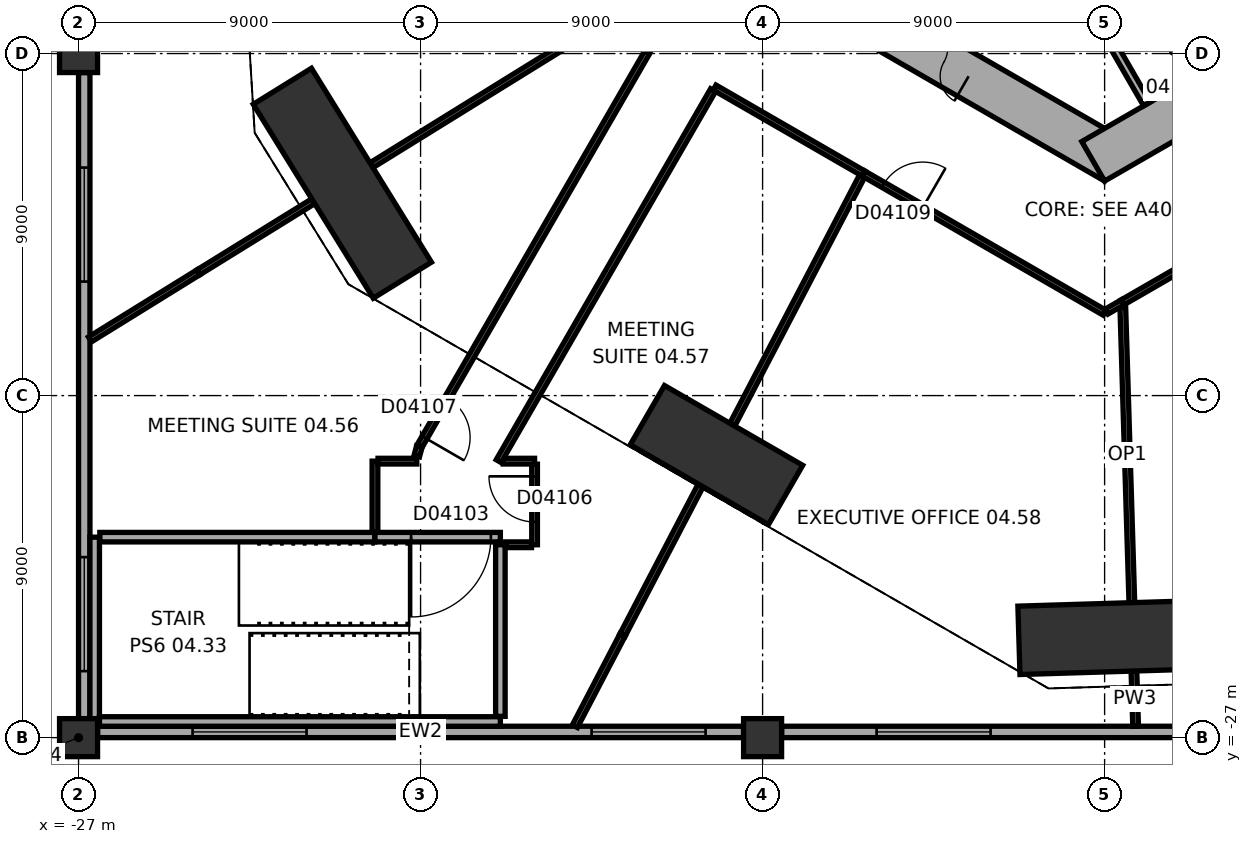
"""IFC4 building model, lengths in metres.
Left out: names, types, materials, properties, quantities, classifications, styles, units other than length and angle.
Written with IfcOpenShell. Run it as: python <this file> out.ifc"""

import sys

from ifc_helpers import new_model, si_unit, direction, frame, frame_2d, origin, origin_2d, place, context, subcontext, project, spatial, rectangle, extrude, element, fill, save


model = new_model("IFC4")
c1 = context("Model", 3, precision=1e-05, world=origin(), true_north=direction((0.0, 1.0)))
c2 = subcontext(c1, "Body", "Model", "MODEL_VIEW")
j1 = project(units=[si_unit("LENGTHUNIT", "METRE"), si_unit("PLANEANGLEUNIT", "RADIAN")], contexts=[c1])
p1 = place(None, origin())
s1 = spatial("IfcSite", under=j1, at=p1, CompositionType="ELEMENT")
p2 = place(p1, origin())
s2 = spatial("IfcBuilding", under=s1, at=p2, CompositionType="ELEMENT")
p3 = place(p2, frame((0.0, 0.0, 29.0)))
s3 = spatial("IfcBuildingStorey", under=s2, at=p3, CompositionType="ELEMENT", Elevation=29.0)
p4 = place(p3, frame((-20.058, -12.413, 0.0), z_axis=(0.0, 0.0, 1.0), x_axis=(0.526202050444, -0.850359572245, 0.0)))
e1 = element("IfcColumn", 1, at=p4, inside=s3, PredefinedType="COLUMN", context=c2, shape_type="SweptSolid", body=[
    extrude(rectangle(XDim=6.0, YDim=1.8, at=origin_2d()), origin(), (0.0, 0.0, 1.0), 5.5),
])
p5 = place(p3, frame((-10.213, -19.564, 0.0), z_axis=(0.0, 0.0, 1.0), x_axis=(0.866028021766, -0.499995465495, 0.0)))
e2 = element("IfcColumn", 2, at=p5, inside=s3, PredefinedType="COLUMN", context=c2, shape_type="SweptSolid", body=[
    extrude(rectangle(XDim=4.2, YDim=1.8, at=origin_2d()), origin(), (0.0, 0.0, 1.0), 5.5),
])
p6 = place(p3, frame((0.744, -24.348, 0.0), z_axis=(0.0, 0.0, 1.0), x_axis=(0.999533484231, 0.03054200224, 0.0)))
e3 = element("IfcColumn", 3, at=p6, inside=s3, PredefinedType="COLUMN", context=c2, shape_type="SweptSolid", body=[
    extrude(rectangle(XDim=6.0, YDim=1.8, at=origin_2d()), origin(), (0.0, 0.0, 1.0), 5.5),
])
for number, where, z_axis, x_axis in (
    (4, (-27.0, -27.0, 0.0), (0.0, 0.0, 1.0), (1.0, 0.0, 0.0)),
    (5, (-27.0, -9.0, 0.0), (0.0, 0.0, 1.0), (1.0, 0.0, 0.0)),
    (6, (-9.0, -27.0, 0.0), (0.0, 0.0, 1.0), (1.0, 0.0, 0.0)),
):
    element("IfcColumn", number, at=place(p3, frame(where, z_axis=z_axis, x_axis=x_axis)), inside=s3, PredefinedType="COLUMN", context=c2, shape_type="SweptSolid", body=[
        extrude(rectangle(XDim=1.0, YDim=1.0, at=origin_2d()), origin(), (0.0, 0.0, 1.0), 5.5),
    ])
p7 = place(p3, frame((-10.4, -5.658, 0.0), z_axis=(0.0, 0.0, 1.0), x_axis=(0.866021384402, -0.500006961711, 0.0)))
e7 = element("IfcWall", 7, at=p7, inside=s3, PredefinedType="SHEAR", context=c2, shape_type="SweptSolid", body=[
    extrude(rectangle(XDim=12.355, YDim=1.2, at=frame_2d((6.178, 0.0))), origin(), (0.0, 0.0, 1.0), 5.5),
])
p8 = place(p7, frame((6.378, 0.0, 0.0)))
e8 = element("IfcOpeningElement", 8, at=p8, cuts=e7, PredefinedType="OPENING", context=c2, shape_type="SweptSolid", body=[
    extrude(rectangle(XDim=1.5, YDim=2.1, at=frame_2d((0.75, 1.05))), frame((0.0, 0.61, 0.0), z_axis=(0.0, -1.0, 0.0), x_axis=(1.0, 0.0, 0.0)), (0.0, 0.0, 1.0), 1.22),
])
p9 = place(p7, frame((3.228, 0.0, 0.0)))
e9 = element("IfcOpeningElement", 9, at=p9, cuts=e7, PredefinedType="OPENING", context=c2, shape_type="SweptSolid", body=[
    extrude(rectangle(XDim=0.9, YDim=2.1, at=frame_2d((0.45, 1.05))), frame((0.0, 0.61, 0.0), z_axis=(0.0, -1.0, 0.0), x_axis=(1.0, 0.0, 0.0)), (0.0, 0.0, 1.0), 1.22),
])
p10 = place(p3, frame((-0.3, -11.836, 0.0), z_axis=(0.0, 0.0, 1.0), x_axis=(0.866021384402, 0.500006961711, 0.0)))
e10 = element("IfcWall", 10, at=p10, inside=s3, PredefinedType="SHEAR", context=c2, shape_type="SweptSolid", body=[
    extrude(rectangle(XDim=12.355, YDim=1.2, at=frame_2d((6.178, 0.0))), origin(), (0.0, 0.0, 1.0), 5.5),
])
p11 = place(p10, frame((2.828, 0.0, 0.0)))
e11 = element("IfcOpeningElement", 11, at=p11, cuts=e10, PredefinedType="OPENING", context=c2, shape_type="SweptSolid", body=[
    extrude(rectangle(XDim=0.9, YDim=2.1, at=frame_2d((0.45, 1.05))), frame((0.0, 0.61, 0.0), z_axis=(0.0, -1.0, 0.0), x_axis=(1.0, 0.0, 0.0)), (0.0, 0.0, 1.0), 1.22),
])
p12 = place(p10, frame((5.428, 0.0, 0.0)))
e12 = element("IfcOpeningElement", 12, at=p12, cuts=e10, PredefinedType="OPENING", context=c2, shape_type="SweptSolid", body=[
    extrude(rectangle(XDim=0.9, YDim=2.1, at=frame_2d((0.45, 1.05))), frame((0.0, 0.61, 0.0), z_axis=(0.0, -1.0, 0.0), x_axis=(1.0, 0.0, 0.0)), (0.0, 0.0, 1.0), 1.22),
])
p13 = place(p10, frame((7.928, 0.0, 0.0)))
e13 = element("IfcOpeningElement", 13, at=p13, cuts=e10, PredefinedType="OPENING", context=c2, shape_type="SweptSolid", body=[
    extrude(rectangle(XDim=1.1, YDim=2.1, at=frame_2d((0.55, 1.05))), frame((0.0, 0.61, 0.0), z_axis=(0.0, -1.0, 0.0), x_axis=(1.0, 0.0, 0.0)), (0.0, 0.0, 1.0), 1.22),
])
p14 = place(p3, frame((-26.5, -26.85, 0.0), z_axis=(0.0, 0.0, 1.0), x_axis=(1.0, 0.0, 0.0)))
e14 = element("IfcWall", 14, at=p14, inside=s3, PredefinedType="STANDARD", context=c2, shape_type="SweptSolid", body=[
    extrude(rectangle(XDim=17.0, YDim=0.3, at=frame_2d((8.5, 0.0))), origin(), (0.0, 0.0, 1.0), 3.95),
])
p15 = place(p14, frame((2.5, 0.0, 1.0)))
e15 = element("IfcOpeningElement", 15, at=p15, cuts=e14, PredefinedType="OPENING", context=c2, shape_type="SweptSolid", body=[
    extrude(rectangle(XDim=3.0, YDim=2.6, at=frame_2d((1.5, 1.3))), frame((0.0, 0.16, 0.0), z_axis=(0.0, -1.0, 0.0), x_axis=(1.0, 0.0, 0.0)), (0.0, 0.0, 1.0), 0.32),
])
p16 = place(p14, frame((13.0, 0.0, 1.0)))
e16 = element("IfcOpeningElement", 16, at=p16, cuts=e14, PredefinedType="OPENING", context=c2, shape_type="SweptSolid", body=[
    extrude(rectangle(XDim=3.0, YDim=2.6, at=frame_2d((1.5, 1.3))), frame((0.0, 0.16, 0.0), z_axis=(0.0, -1.0, 0.0), x_axis=(1.0, 0.0, 0.0)), (0.0, 0.0, 1.0), 0.32),
])
p17 = place(p3, frame((-8.5, -26.85, 0.0), z_axis=(0.0, 0.0, 1.0), x_axis=(1.0, 0.0, 0.0)))
e17 = element("IfcWall", 17, at=p17, inside=s3, PredefinedType="STANDARD", context=c2, shape_type="SweptSolid", body=[
    extrude(rectangle(XDim=17.0, YDim=0.3, at=frame_2d((8.5, 0.0))), origin(), (0.0, 0.0, 1.0), 3.95),
])
p18 = place(p17, frame((2.5, 0.0, 1.0)))
e18 = element("IfcOpeningElement", 18, at=p18, cuts=e17, PredefinedType="OPENING", context=c2, shape_type="SweptSolid", body=[
    extrude(rectangle(XDim=3.0, YDim=2.6, at=frame_2d((1.5, 1.3))), frame((0.0, 0.16, 0.0), z_axis=(0.0, -1.0, 0.0), x_axis=(1.0, 0.0, 0.0)), (0.0, 0.0, 1.0), 0.32),
])
p19 = place(p17, frame((11.5, 0.0, 1.0)))
e19 = element("IfcOpeningElement", 19, at=p19, cuts=e17, PredefinedType="OPENING", context=c2, shape_type="SweptSolid", body=[
    extrude(rectangle(XDim=3.0, YDim=2.6, at=frame_2d((1.5, 1.3))), frame((0.0, 0.16, 0.0), z_axis=(0.0, -1.0, 0.0), x_axis=(1.0, 0.0, 0.0)), (0.0, 0.0, 1.0), 0.32),
])
p20 = place(p3, frame((-26.85, -9.5, 0.0), z_axis=(0.0, 0.0, 1.0), x_axis=(0.0, -1.0, 0.0)))
e20 = element("IfcWall", 20, at=p20, inside=s3, PredefinedType="STANDARD", context=c2, shape_type="SweptSolid", body=[
    extrude(rectangle(XDim=17.0, YDim=0.3, at=frame_2d((8.5, 0.0))), origin(), (0.0, 0.0, 1.0), 3.95),
])
p21 = place(p20, frame((2.5, 0.0, 1.0)))
e21 = element("IfcOpeningElement", 21, at=p21, cuts=e20, PredefinedType="OPENING", context=c2, shape_type="SweptSolid", body=[
    extrude(rectangle(XDim=3.0, YDim=2.6, at=frame_2d((1.5, 1.3))), frame((0.0, 0.16, 0.0), z_axis=(0.0, -1.0, 0.0), x_axis=(1.0, 0.0, 0.0)), (0.0, 0.0, 1.0), 0.32),
])
p22 = place(p20, frame((12.75, 0.0, 1.0)))
e22 = element("IfcOpeningElement", 22, at=p22, cuts=e20, PredefinedType="OPENING", context=c2, shape_type="SweptSolid", body=[
    extrude(rectangle(XDim=3.0, YDim=2.6, at=frame_2d((1.5, 1.3))), frame((0.0, 0.16, 0.0), z_axis=(0.0, -1.0, 0.0), x_axis=(1.0, 0.0, 0.0)), (0.0, 0.0, 1.0), 0.32),
])
p23 = place(p3, frame((0.013, -8.422, 0.0), z_axis=(0.0, 0.0, 1.0), x_axis=(0.500077893725, -0.86598042715, 0.0)))
e23 = element("IfcWall", 23, at=p23, inside=s3, PredefinedType="PARTITIONING", context=c2, shape_type="SweptSolid", body=[
    extrude(rectangle(XDim=2.2, YDim=0.2, at=frame_2d((1.1, 0.0))), origin(), (0.0, 0.0, 1.0), 5.15),
])
p24 = place(p3, frame((0.771, -25.248, 0.0), z_axis=(0.0, 0.0, 1.0), x_axis=(0.030584206332, -0.99953219374, 0.0)))
e24 = element("IfcWall", 24, at=p24, inside=s3, PredefinedType="PARTITIONING", context=c2, shape_type="SweptSolid", body=[
    extrude(rectangle(XDim=1.453, YDim=0.15, at=frame_2d((0.727, 0.0))), origin(), (0.0, 0.0, 1.0), 5.15),
])
p25 = place(p3, frame((-12.686, -24.3, 0.0), z_axis=(0.0, 0.0, 1.0), x_axis=(-0.462800215564, -0.886462610872, 0.0)))
e25 = element("IfcWall", 25, at=p25, inside=s3, PredefinedType="PARTITIONING", context=c2, shape_type="SweptSolid", body=[
    extrude(rectangle(XDim=2.707, YDim=0.15, at=frame_2d((1.354, 0.0))), origin(), (0.0, 0.0, 1.0), 5.15),
])
p26 = place(p3, frame((-12.686, -24.3, 0.0), z_axis=(0.0, 0.0, 1.0), x_axis=(0.462800821993, 0.88646229427, 0.0)))
e26 = element("IfcWall", 26, at=p26, inside=s3, PredefinedType="PARTITIONING", context=c2, shape_type="SweptSolid", body=[
    extrude(rectangle(XDim=4.441, YDim=0.15, at=frame_2d((2.221, 0.0))), origin(), (0.0, 0.0, 1.0), 5.15),
])
p27 = place(p3, frame((-15.9, -21.925, 0.0), z_axis=(0.0, 0.0, 1.0), x_axis=(0.0, -1.0, 0.0)))
e27 = element("IfcWall", 27, at=p27, inside=s3, PredefinedType="SOLIDWALL", context=c2, shape_type="SweptSolid", body=[
    extrude(rectangle(XDim=4.515, YDim=0.25, at=frame_2d((2.257, 0.0))), origin(), (0.0, 0.0, 1.0), 5.15),
])
p28 = place(p3, frame((-15.08, -21.925, 0.0), z_axis=(0.0, 0.0, 1.0), x_axis=(-1.0, 0.0, 0.0)))
e28 = element("IfcWall", 28, at=p28, inside=s3, PredefinedType="PARTITIONING", context=c2, shape_type="SweptSolid", body=[
    extrude(rectangle(XDim=0.68, YDim=0.15, at=frame_2d((0.34, 0.0))), origin(), (0.0, 0.0, 1.0), 5.15),
])
p29 = place(p3, frame((-26.44, -21.725, 0.0), z_axis=(0.0, 0.0, 1.0), x_axis=(1.0, 0.0, 0.0)))
e29 = element("IfcWall", 29, at=p29, inside=s3, PredefinedType="SOLIDWALL", context=c2, shape_type="SweptSolid", body=[
    extrude(rectangle(XDim=7.24, YDim=0.25, at=frame_2d((3.62, 0.0))), origin(), (0.0, 0.0, 1.0), 5.15),
])
p30 = place(p3, frame((-19.2, -21.725, 0.0), z_axis=(0.0, 0.0, 1.0), x_axis=(1.0, 0.0, 0.0)))
e30 = element("IfcWall", 30, at=p30, inside=s3, PredefinedType="SOLIDWALL", context=c2, shape_type="SweptSolid", body=[
    extrude(rectangle(XDim=3.3, YDim=0.25, at=frame_2d((1.65, 0.0))), origin(), (0.0, 0.0, 1.0), 5.15),
])
p31 = place(p30, frame((0.95, 0.0, 0.0)))
e31 = element("IfcOpeningElement", 31, at=p31, cuts=e30, PredefinedType="OPENING", context=c2, shape_type="SweptSolid", body=[
    extrude(rectangle(XDim=2.1, YDim=2.4, at=frame_2d((1.05, 1.2))), frame((0.0, 0.135, 0.0), z_axis=(0.0, -1.0, 0.0), x_axis=(1.0, 0.0, 0.0)), (0.0, 0.0, 1.0), 0.27),
])
p32 = place(p3, frame((-19.2, -21.585, 0.0), z_axis=(0.0, 0.0, 1.0), x_axis=(0.0, 1.0, 0.0)))
e32 = element("IfcWall", 32, at=p32, inside=s3, PredefinedType="PARTITIONING", context=c2, shape_type="SweptSolid", body=[
    extrude(rectangle(XDim=1.86, YDim=0.15, at=frame_2d((0.93, 0.0))), origin(), (0.0, 0.0, 1.0), 5.15),
])
p33 = place(p3, frame((-15.0, -19.805, 0.0), z_axis=(0.0, 0.0, 1.0), x_axis=(0.0, -1.0, 0.0)))
e33 = element("IfcWall", 33, at=p33, inside=s3, PredefinedType="PARTITIONING", context=c2, shape_type="SweptSolid", body=[
    extrude(rectangle(XDim=2.12, YDim=0.15, at=frame_2d((1.06, 0.0))), origin(), (0.0, 0.0, 1.0), 5.15),
])
p34 = place(p33, frame((0.32, 0.0, 0.0)))
e34 = element("IfcOpeningElement", 34, at=p34, cuts=e33, PredefinedType="OPENING", context=c2, shape_type="SweptSolid", body=[
    extrude(rectangle(XDim=1.2, YDim=2.1, at=frame_2d((0.6, 1.05))), frame((0.0, 0.085, 0.0), z_axis=(0.0, -1.0, 0.0), x_axis=(1.0, 0.0, 0.0)), (0.0, 0.0, 1.0), 0.17),
])
p35 = place(p3, frame((-19.12, -19.725, 0.0), z_axis=(0.0, 0.0, 1.0), x_axis=(1.0, 0.0, 0.0)))
e35 = element("IfcWall", 35, at=p35, inside=s3, PredefinedType="PARTITIONING", context=c2, shape_type="SweptSolid", body=[
    extrude(rectangle(XDim=1.02, YDim=0.15, at=frame_2d((0.51, 0.0))), origin(), (0.0, 0.0, 1.0), 5.15),
])
p36 = place(p3, frame((-15.825, -19.725, 0.0), z_axis=(0.0, 0.0, 1.0), x_axis=(1.0, 0.0, 0.0)))
e36 = element("IfcWall", 36, at=p36, inside=s3, PredefinedType="PARTITIONING", context=c2, shape_type="SweptSolid", body=[
    extrude(rectangle(XDim=0.825, YDim=0.15, at=frame_2d((0.413, 0.0))), origin(), (0.0, 0.0, 1.0), 5.15),
])
p37 = place(p3, frame((-18.1, -19.593, 0.0), z_axis=(0.0, 0.0, 1.0), x_axis=(0.260139468531, 0.965571052234, 0.0)))
e37 = element("IfcWall", 37, at=p37, inside=s3, PredefinedType="PARTITIONING", context=c2, shape_type="SweptSolid", body=[
    extrude(rectangle(XDim=0.264, YDim=0.15, at=frame_2d((0.132, 0.0))), origin(), (0.0, 0.0, 1.0), 5.15),
])
p38 = place(p3, frame((-18.021, -19.321, 0.0), z_axis=(0.0, 0.0, 1.0), x_axis=(0.500403049961, 0.865792577694, 0.0)))
e38 = element("IfcWall", 38, at=p38, inside=s3, PredefinedType="PARTITIONING", context=c2, shape_type="SweptSolid", body=[
    extrude(rectangle(XDim=11.963, YDim=0.15, at=frame_2d((5.982, 0.0))), origin(), (0.0, 0.0, 1.0), 5.15),
])
p39 = place(p38, frame((0.25, 0.0, 0.0)))
e39 = element("IfcOpeningElement", 39, at=p39, cuts=e38, PredefinedType="OPENING", context=c2, shape_type="SweptSolid", body=[
    extrude(rectangle(XDim=1.2, YDim=2.1, at=frame_2d((0.6, 1.05))), frame((0.0, 0.085, 0.0), z_axis=(0.0, -1.0, 0.0), x_axis=(1.0, 0.0, 0.0)), (0.0, 0.0, 1.0), 0.17),
])
p40 = place(p3, frame((-9.796, -18.766, 0.0), z_axis=(0.0, 0.0, 1.0), x_axis=(0.462793341808, 0.886466199456, 0.0)))
e40 = element("IfcWall", 40, at=p40, inside=s3, PredefinedType="PARTITIONING", context=c2, shape_type="SweptSolid", body=[
    extrude(rectangle(XDim=7.376, YDim=0.15, at=frame_2d((3.688, 0.0))), origin(), (0.0, 0.0, 1.0), 5.15),
])
p41 = place(p3, frame((0.0, -15.82, 0.0), z_axis=(0.0, 0.0, 1.0), x_axis=(-0.866018019704, 0.500012789385, 0.0)))
e41 = element("IfcWall", 41, at=p41, inside=s3, PredefinedType="PARTITIONING", context=c2, shape_type="SweptSolid", body=[
    extrude(rectangle(XDim=7.327, YDim=0.15, at=frame_2d((3.664, 0.0))), origin(), (0.0, 0.0, 1.0), 5.15),
])
p42 = place(p41, frame((5.527, 0.0, 0.0)))
e42 = element("IfcOpeningElement", 42, at=p42, cuts=e41, PredefinedType="OPENING", context=c2, shape_type="SweptSolid", body=[
    extrude(rectangle(XDim=1.2, YDim=2.1, at=frame_2d((0.6, 1.05))), frame((0.0, 0.085, 0.0), z_axis=(0.0, -1.0, 0.0), x_axis=(1.0, 0.0, 0.0)), (0.0, 0.0, 1.0), 0.17),
])
p43 = place(p3, frame((0.479, -15.665, 0.0), z_axis=(0.0, 0.0, 1.0), x_axis=(0.030535907252, -0.999533670453, 0.0)))
e43 = element("IfcWall", 43, at=p43, inside=s3, PredefinedType="MOVABLE", context=c2, shape_type="SweptSolid", body=[
    extrude(rectangle(XDim=7.787, YDim=0.15, at=frame_2d((3.894, 0.0))), origin(), (0.0, 0.0, 1.0), 5.15),
])
p44 = place(p3, frame((0.475, -15.545, 0.0), z_axis=(0.0, 0.0, 1.0), x_axis=(0.866021168401, 0.500007335828, 0.0)))
e44 = element("IfcWall", 44, at=p44, inside=s3, PredefinedType="PARTITIONING", context=c2, shape_type="SweptSolid", body=[
    extrude(rectangle(XDim=7.616, YDim=0.15, at=frame_2d((3.808, 0.0))), origin(), (0.0, 0.0, 1.0), 5.15),
])
p45 = place(p3, frame((0.475, -15.545, 0.0), z_axis=(0.0, 0.0, 1.0), x_axis=(-0.865927594567, -0.50016937228, 0.0)))
e45 = element("IfcWall", 45, at=p45, inside=s3, PredefinedType="PARTITIONING", context=c2, shape_type="SweptSolid", body=[
    extrude(rectangle(XDim=0.489, YDim=0.15, at=frame_2d((0.244, 0.0))), origin(), (0.0, 0.0, 1.0), 5.15),
])
p46 = place(p3, frame((-23.843, -14.754, 0.0), z_axis=(0.0, 0.0, 1.0), x_axis=(-0.850333278488, -0.526244539635, 0.0)))
e46 = element("IfcWall", 46, at=p46, inside=s3, PredefinedType="PARTITIONING", context=c2, shape_type="SweptSolid", body=[
    extrude(rectangle(XDim=3.36, YDim=0.15, at=frame_2d((1.68, 0.0))), origin(), (0.0, 0.0, 1.0), 5.15),
])
p47 = place(p3, frame((-23.843, -14.754, 0.0), z_axis=(0.0, 0.0, 1.0), x_axis=(0.850369165181, 0.526186547633, 0.0)))
e47 = element("IfcWall", 47, at=p47, inside=s3, PredefinedType="PARTITIONING", context=c2, shape_type="SweptSolid", body=[
    extrude(rectangle(XDim=3.551, YDim=0.15, at=frame_2d((1.775, 0.0))), origin(), (0.0, 0.0, 1.0), 5.15),
])
p48 = place(p3, frame((-6.346, -12.156, 0.0), z_axis=(0.0, 0.0, 1.0), x_axis=(-0.866015706063, 0.50001679657, 0.0)))
e48 = element("IfcWall", 48, at=p48, inside=s3, PredefinedType="PARTITIONING", context=c2, shape_type="SweptSolid", body=[
    extrude(rectangle(XDim=4.523, YDim=0.15, at=frame_2d((2.262, 0.0))), origin(), (0.0, 0.0, 1.0), 5.15),
])
p49 = place(p3, frame((-19.293, -11.939, 0.0), z_axis=(0.0, 0.0, 1.0), x_axis=(0.85034374829, 0.526227621609, 0.0)))
e49 = element("IfcWall", 49, at=p49, inside=s3, PredefinedType="PARTITIONING", context=c2, shape_type="SweptSolid", body=[
    extrude(rectangle(XDim=7.016, YDim=0.15, at=frame_2d((3.508, 0.0))), origin(), (0.0, 0.0, 1.0), 5.15),
])
p50 = place(p3, frame((-10.303, -9.963, 0.0), z_axis=(0.0, 0.0, 1.0), x_axis=(-0.500409628778, -0.865788775295, 0.0)))
e50 = element("IfcWall", 50, at=p50, inside=s3, PredefinedType="PARTITIONING", context=c2, shape_type="SweptSolid", body=[
    extrude(rectangle(XDim=11.275, YDim=0.15, at=frame_2d((5.637, 0.0))), origin(), (0.0, 0.0, 1.0), 5.15),
])
p51 = place(p3, frame((-11.995, -8.894, 0.0), z_axis=(0.0, 0.0, 1.0), x_axis=(-0.866076810767, 0.499910949922, 0.0)))
e51 = element("IfcWall", 51, at=p51, inside=s3, PredefinedType="PARTITIONING", context=c2, shape_type="SweptSolid", body=[
    extrude(rectangle(XDim=1.42, YDim=0.15, at=frame_2d((0.71, 0.0))), origin(), (0.0, 0.0, 1.0), 5.15),
])
p52 = place(p3, frame((-26.575, -21.725, 0.0), z_axis=(0.0, 0.0, 1.0), x_axis=(0.0, -1.0, 0.0)))
e52 = element("IfcWall", 52, at=p52, inside=s3, PredefinedType="SOLIDWALL", context=c2, shape_type="SweptSolid", body=[
    extrude(rectangle(XDim=4.975, YDim=0.25, at=frame_2d((2.487, 0.0))), origin(), (0.0, 0.0, 1.0), 5.15),
])
p53 = place(p3, frame((-26.45, -26.575, 0.0), z_axis=(0.0, 0.0, 1.0), x_axis=(1.0, 0.0, 0.0)))
e53 = element("IfcWall", 53, at=p53, inside=s3, PredefinedType="SOLIDWALL", context=c2, shape_type="SweptSolid", body=[
    extrude(rectangle(XDim=10.55, YDim=0.25, at=frame_2d((5.275, 0.0))), origin(), (0.0, 0.0, 1.0), 5.15),
])
p54 = place(p15, origin())
e54 = element("IfcWindow", 54, at=p54, inside=s3, PartitioningType="SINGLE_PANEL", PredefinedType="WINDOW", context=c2, shape_type="SweptSolid", body=[
    extrude(rectangle(XDim=3.0, YDim=2.6, at=frame_2d((1.5, 1.3))), frame((0.0, 0.03, 0.0), z_axis=(0.0, -1.0, 0.0), x_axis=(1.0, 0.0, 0.0)), (0.0, 0.0, 1.0), 0.06),
])
fill(e15, e54)
p55 = place(p16, origin())
e55 = element("IfcWindow", 55, at=p55, inside=s3, PartitioningType="SINGLE_PANEL", PredefinedType="WINDOW", context=c2, shape_type="SweptSolid", body=[
    extrude(rectangle(XDim=3.0, YDim=2.6, at=frame_2d((1.5, 1.3))), frame((0.0, 0.03, 0.0), z_axis=(0.0, -1.0, 0.0), x_axis=(1.0, 0.0, 0.0)), (0.0, 0.0, 1.0), 0.06),
])
fill(e16, e55)
p56 = place(p18, origin())
e56 = element("IfcWindow", 56, at=p56, inside=s3, PartitioningType="SINGLE_PANEL", PredefinedType="WINDOW", context=c2, shape_type="SweptSolid", body=[
    extrude(rectangle(XDim=3.0, YDim=2.6, at=frame_2d((1.5, 1.3))), frame((0.0, 0.03, 0.0), z_axis=(0.0, -1.0, 0.0), x_axis=(1.0, 0.0, 0.0)), (0.0, 0.0, 1.0), 0.06),
])
fill(e18, e56)
p57 = place(p21, origin())
e57 = element("IfcWindow", 57, at=p57, inside=s3, PartitioningType="SINGLE_PANEL", PredefinedType="WINDOW", context=c2, shape_type="SweptSolid", body=[
    extrude(rectangle(XDim=3.0, YDim=2.6, at=frame_2d((1.5, 1.3))), frame((0.0, 0.03, 0.0), z_axis=(0.0, -1.0, 0.0), x_axis=(1.0, 0.0, 0.0)), (0.0, 0.0, 1.0), 0.06),
])
fill(e21, e57)
p58 = place(p22, origin())
e58 = element("IfcWindow", 58, at=p58, inside=s3, PartitioningType="SINGLE_PANEL", PredefinedType="WINDOW", context=c2, shape_type="SweptSolid", body=[
    extrude(rectangle(XDim=3.0, YDim=2.6, at=frame_2d((1.5, 1.3))), frame((0.0, 0.03, 0.0), z_axis=(0.0, -1.0, 0.0), x_axis=(1.0, 0.0, 0.0)), (0.0, 0.0, 1.0), 0.06),
])
fill(e22, e58)
p59 = place(p8, origin())
e59 = element("IfcDoor", 59, at=p59, inside=s3, OperationType="DOUBLE_DOOR_SINGLE_SWING", PredefinedType="DOOR", context=c2, shape_type="SweptSolid", body=[
    extrude(rectangle(XDim=1.5, YDim=2.1, at=frame_2d((0.75, 1.05))), frame((0.0, 0.025, 0.0), z_axis=(0.0, -1.0, 0.0), x_axis=(1.0, 0.0, 0.0)), (0.0, 0.0, 1.0), 0.05),
])
fill(e8, e59)
p60 = place(p31, frame((2.1, 0.0, 0.0), z_axis=(0.0, 0.0, 1.0), x_axis=(-1.0, 0.0, 0.0)))
e60 = element("IfcDoor", 60, at=p60, inside=s3, OperationType="DOUBLE_DOOR_SINGLE_SWING", PredefinedType="DOOR", context=c2, shape_type="SweptSolid", body=[
    extrude(rectangle(XDim=2.1, YDim=2.4, at=frame_2d((1.05, 1.2))), frame((0.0, 0.025, 0.0), z_axis=(0.0, -1.0, 0.0), x_axis=(1.0, 0.0, 0.0)), (0.0, 0.0, 1.0), 0.05),
])
fill(e31, e60)
p61 = place(p34, origin())
e61 = element("IfcDoor", 61, at=p61, inside=s3, OperationType="SINGLE_SWING_LEFT", PredefinedType="DOOR", context=c2, shape_type="SweptSolid", body=[
    extrude(rectangle(XDim=1.2, YDim=2.1, at=frame_2d((0.6, 1.05))), frame((0.0, 0.025, 0.0), z_axis=(0.0, -1.0, 0.0), x_axis=(1.0, 0.0, 0.0)), (0.0, 0.0, 1.0), 0.05),
])
fill(e34, e61)
p62 = place(p39, origin())
e62 = element("IfcDoor", 62, at=p62, inside=s3, OperationType="SINGLE_SWING_LEFT", PredefinedType="DOOR", context=c2, shape_type="SweptSolid", body=[
    extrude(rectangle(XDim=1.2, YDim=2.1, at=frame_2d((0.6, 1.05))), frame((0.0, 0.025, 0.0), z_axis=(0.0, -1.0, 0.0), x_axis=(1.0, 0.0, 0.0)), (0.0, 0.0, 1.0), 0.05),
])
fill(e39, e62)
p63 = place(p42, origin())
e63 = element("IfcDoor", 63, at=p63, inside=s3, OperationType="SINGLE_SWING_LEFT", PredefinedType="DOOR", context=c2, shape_type="SweptSolid", body=[
    extrude(rectangle(XDim=1.2, YDim=2.1, at=frame_2d((0.6, 1.05))), frame((0.0, 0.025, 0.0), z_axis=(0.0, -1.0, 0.0), x_axis=(1.0, 0.0, 0.0)), (0.0, 0.0, 1.0), 0.05),
])
fill(e42, e63)
save(model, sys.argv[1])
